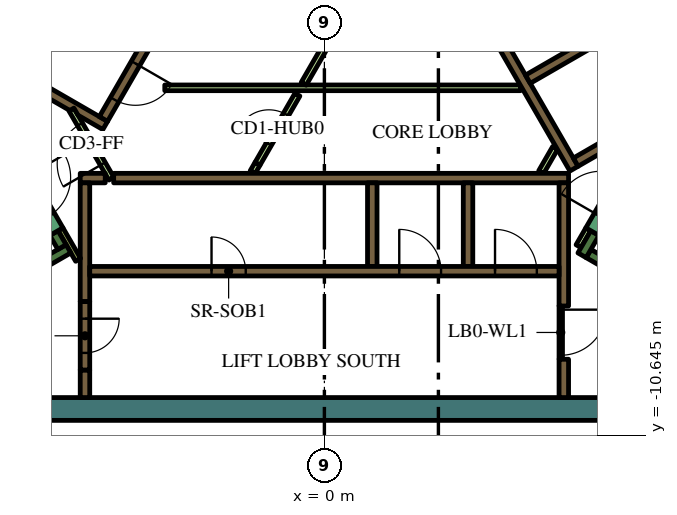
"""IFC4 building model, lengths in metres.
Left out: names, types, materials, properties, quantities, classifications, styles, units other than length and angle.
Written with IfcOpenShell. Run it as: python <this file> out.ifc"""

import sys

from ifc_helpers import new_model, si_unit, direction, frame, frame_2d, origin, place, context, subcontext, project, spatial, polyline, rectangle, outline, extrude, element, fill, save


model = new_model("IFC4")
c1 = context("Model", 3, precision=1e-05, world=origin(), true_north=direction((0.0, 1.0)))
c2 = subcontext(c1, "Body", "Model", "MODEL_VIEW")
j1 = project(units=[si_unit("LENGTHUNIT", "METRE"), si_unit("PLANEANGLEUNIT", "RADIAN")], contexts=[c1])
p1 = place(None, origin())
s1 = spatial("IfcSite", under=j1, at=p1, CompositionType="ELEMENT")
p2 = place(p1, origin())
s2 = spatial("IfcBuilding", under=s1, at=p2, CompositionType="ELEMENT")
p3 = place(p2, frame((0.0, 0.0, 321.6)))
s3 = spatial("IfcBuildingStorey", under=s2, at=p3, CompositionType="ELEMENT", Elevation=321.6)
p4 = place(p3, frame((8.904, -9.95, 0.0), z_axis=(0.0, 0.0, 1.0), x_axis=(-1.0, 0.0, 0.0)))
e1 = element("IfcWall", 1, at=p4, inside=s3, PredefinedType="SOLIDWALL", context=c2, shape_type="SweptSolid", body=[
    extrude(rectangle(XDim=22.161, YDim=0.6, at=frame_2d((11.081, 0.0))), origin(), (0.0, 0.0, 1.0), 6.0),
])
p5 = place(p3, frame((-4.652, 11.842, 0.0), z_axis=(0.0, 0.0, 1.0), x_axis=(-0.500003640647, -0.866023301845, 0.0)))
e2 = element("IfcWall", 2, at=p5, inside=s3, PredefinedType="SOLIDWALL", context=c2, shape_type="SweptSolid", body=[
    extrude(rectangle(XDim=15.858, YDim=0.6, at=frame_2d((7.929, 0.0))), origin(), (0.0, 0.0, 1.0), 6.0),
])
p6 = place(p3, frame((12.84, -9.261, 0.0), z_axis=(0.0, 0.0, 1.0), x_axis=(-0.866013990052, 0.500019768644, 0.0)))
e3 = element("IfcWall", 3, at=p6, inside=s3, PredefinedType="SOLIDWALL", context=c2, shape_type="SweptSolid", body=[
    extrude(rectangle(XDim=6.8, YDim=0.25, at=frame_2d((3.4, 0.0))), origin(), (0.0, 0.0, 1.0), 6.0),
])
p7 = place(p3, frame((6.78, -5.906, 0.0), z_axis=(0.0, 0.0, 1.0), x_axis=(0.500223362819, 0.865896406789, 0.0)))
e4 = element("IfcWall", 4, at=p7, inside=s3, PredefinedType="SOLIDWALL", context=c2, shape_type="SweptSolid", body=[
    extrude(rectangle(XDim=0.675, YDim=0.25, at=frame_2d((0.337, 0.0))), origin(), (0.0, 0.0, 1.0), 6.0),
])
p8 = place(p3, frame((-12.84, -9.261, 0.0), z_axis=(0.0, 0.0, 1.0), x_axis=(0.866016039709, 0.500016218704, 0.0)))
e5 = element("IfcWall", 5, at=p8, inside=s3, PredefinedType="SOLIDWALL", context=c2, shape_type="SweptSolid", body=[
    extrude(rectangle(XDim=7.05, YDim=0.25, at=frame_2d((3.525, 0.0))), origin(), (0.0, 0.0, 1.0), 6.0),
])
p9 = place(p3, frame((-6.905, -5.69, 0.0), z_axis=(0.0, 0.0, 1.0), x_axis=(-0.500402024738, 0.865793170242, 0.0)))
e6 = element("IfcWall", 6, at=p9, inside=s3, PredefinedType="SOLIDWALL", context=c2, shape_type="SweptSolid", body=[
    extrude(rectangle(XDim=0.425, YDim=0.25, at=frame_2d((0.212, 0.0))), origin(), (0.0, 0.0, 1.0), 6.0),
])
p10 = place(p3, frame((-5.545, -3.875, 0.0), z_axis=(0.0, 0.0, 1.0), x_axis=(1.0, 0.0, 0.0)))
e7 = element("IfcWall", 7, at=p10, inside=s3, PredefinedType="SOLIDWALL", context=c2, shape_type="SweptSolid", body=[
    extrude(rectangle(XDim=11.97, YDim=0.25, at=frame_2d((5.985, 0.0))), origin(), (0.0, 0.0, 1.0), 6.0),
])
p11 = place(p3, frame((-6.425, -3.875, 0.0), z_axis=(0.0, 0.0, 1.0), x_axis=(1.0, 0.0, 0.0)))
e8 = element("IfcWall", 8, at=p11, inside=s3, PredefinedType="SOLIDWALL", context=c2, shape_type="SweptSolid", body=[
    extrude(rectangle(XDim=0.658, YDim=0.25, at=frame_2d((0.329, 0.0))), origin(), (0.0, 0.0, 1.0), 6.0),
])
p12 = place(p3, frame((6.3, -7.24, 0.0), z_axis=(0.0, 0.0, 1.0), x_axis=(0.0, 1.0, 0.0)))
e9 = element("IfcWall", 9, at=p12, inside=s3, PredefinedType="SOLIDWALL", context=c2, shape_type="SweptSolid", body=[
    extrude(rectangle(XDim=3.24, YDim=0.25, at=frame_2d((1.62, 0.0))), origin(), (0.0, 0.0, 1.0), 6.0),
])
p13 = place(p3, frame((6.3, -9.65, 0.0), z_axis=(0.0, 0.0, 1.0), x_axis=(0.0, 1.0, 0.0)))
e10 = element("IfcWall", 10, at=p13, inside=s3, PredefinedType="SOLIDWALL", context=c2, shape_type="SweptSolid", body=[
    extrude(rectangle(XDim=1.008, YDim=0.25, at=frame_2d((0.504, 0.0))), origin(), (0.0, 0.0, 1.0), 6.0),
])
for number, where, z_axis, x_axis in (
    (11, (3.78, -4.0, 0.0), (0.0, 0.0, 1.0), (0.0, -1.0, 0.0)),
    (12, (1.26, -4.0, 0.0), (0.0, 0.0, 1.0), (0.0, -1.0, 0.0)),
):
    element("IfcWall", number, at=place(p3, frame(where, z_axis=z_axis, x_axis=x_axis)), inside=s3, PredefinedType="SOLIDWALL", context=c2, shape_type="SweptSolid", body=[
        extrude(rectangle(XDim=2.2, YDim=0.25, at=frame_2d((1.1, 0.0))), origin(), (0.0, 0.0, 1.0), 6.0),
    ])
p14 = place(p3, frame((-6.3, -7.125, 0.0), z_axis=(0.0, 0.0, 1.0), x_axis=(0.0, 1.0, 0.0)))
e13 = element("IfcWall", 13, at=p14, inside=s3, PredefinedType="SOLIDWALL", context=c2, shape_type="SweptSolid", body=[
    extrude(rectangle(XDim=3.125, YDim=0.25, at=frame_2d((1.562, 0.0))), origin(), (0.0, 0.0, 1.0), 6.0),
])
p15 = place(p3, frame((-6.3, -8.925, 0.0), z_axis=(0.0, 0.0, 1.0), x_axis=(0.0, -1.0, 0.0)))
e14 = element("IfcWall", 14, at=p15, inside=s3, PredefinedType="SOLIDWALL", context=c2, shape_type="SweptSolid", body=[
    extrude(rectangle(XDim=0.725, YDim=0.25, at=frame_2d((0.363, 0.0))), origin(), (0.0, 0.0, 1.0), 6.0),
])
p16 = place(p3, frame((6.568, -3.627, 0.0), z_axis=(0.0, 0.0, 1.0), x_axis=(-0.499999455981, 0.866025717874, 0.0)))
e15 = element("IfcWall", 15, at=p16, inside=s3, PredefinedType="SOLIDWALL", context=c2, shape_type="SweptSolid", body=[
    extrude(rectangle(XDim=11.978, YDim=0.25, at=frame_2d((5.989, 0.0))), origin(), (0.0, 0.0, 1.0), 6.0),
])
p17 = place(p3, frame((5.354, -1.274, 0.0), z_axis=(0.0, 0.0, 1.0), x_axis=(0.866008176907, 0.50002983664, 0.0)))
e16 = element("IfcWall", 16, at=p17, inside=s3, PredefinedType="SOLIDWALL", context=c2, shape_type="SweptSolid", body=[
    extrude(rectangle(XDim=2.2, YDim=0.25, at=frame_2d((1.1, 0.0))), origin(), (0.0, 0.0, 1.0), 6.0),
])
p18 = place(p3, frame((6.614, -3.456, 0.0), z_axis=(0.0, 0.0, 1.0), x_axis=(0.866025089694, 0.500000544019, 0.0)))
e17 = element("IfcWall", 17, at=p18, inside=s3, PredefinedType="SOLIDWALL", context=c2, shape_type="SweptSolid", body=[
    extrude(rectangle(XDim=2.305, YDim=0.25, at=frame_2d((1.153, 0.0))), origin(), (0.0, 0.0, 1.0), 6.0),
])
p19 = place(p3, frame((-8.06, -1.311, 0.0), z_axis=(0.0, 0.0, 1.0), x_axis=(0.50000273126, 0.866023826885, 0.0)))
e18 = element("IfcWall", 18, at=p19, inside=s3, PredefinedType="SOLIDWALL", context=c2, shape_type="SweptSolid", body=[
    extrude(rectangle(XDim=10.33, YDim=0.25, at=frame_2d((5.165, 0.0))), origin(), (0.0, 0.0, 1.0), 6.0),
])
p20 = place(p3, origin())
e19 = element("IfcWall", 19, at=p20, inside=s3, PredefinedType="SOLIDWALL", context=c2, shape_type="SweptSolid", body=[
    extrude(outline(polyline([(-5.922, -2.257), (-5.922, -2.257), (-5.705, -2.382), (-5.83, -2.598), (-6.483, -2.221), (-6.591, -2.033), (-6.591, -2.033), (-6.7, -2.096), (-7.952, -1.373), (-7.827, -1.156), (-5.922, -2.257)])), origin(), (0.0, 0.0, 1.0), 6.0),
])
p21 = place(p3, frame((-6.48, -6.027, 0.0), z_axis=(0.0, 0.0, 1.0), x_axis=(-0.499927229454, 0.866067413802, 0.0)))
e20 = element("IfcWall", 20, at=p21, inside=s3, PredefinedType="PARTITIONING", context=c2, shape_type="SweptSolid", body=[
    extrude(rectangle(XDim=0.929, YDim=0.15, at=frame_2d((0.464, 0.0))), origin(), (0.0, 0.0, 1.0), 6.0),
])
p22 = place(p3, frame((6.945, -5.222, 0.0), z_axis=(0.0, 0.0, 1.0), x_axis=(-0.499818422106, -0.866130212453, 0.0)))
e21 = element("IfcWall", 21, at=p22, inside=s3, PredefinedType="PARTITIONING", context=c2, shape_type="SweptSolid", body=[
    extrude(rectangle(XDim=0.514, YDim=0.15, at=frame_2d((0.257, 0.0))), origin(), (0.0, 0.0, 1.0), 5.3),
])
p23 = place(p3, frame((5.705, -3.718, 0.0), z_axis=(0.0, 0.0, 1.0), x_axis=(0.499962090823, 0.866047289552, 0.0)))
e22 = element("IfcWall", 22, at=p23, inside=s3, PredefinedType="PARTITIONING", context=c2, shape_type="SweptSolid", body=[
    extrude(rectangle(XDim=0.735, YDim=0.15, at=frame_2d((0.367, 0.0))), origin(), (0.0, 0.0, 1.0), 5.3),
])
p24 = place(p3, frame((-4.2, -1.5, 0.0), z_axis=(0.0, 0.0, 1.0), x_axis=(1.0, 0.0, 0.0)))
e23 = element("IfcWall", 23, at=p24, inside=s3, PredefinedType="PARTITIONING", context=c2, shape_type="SweptSolid", body=[
    extrude(rectangle(XDim=9.359, YDim=0.15, at=frame_2d((4.68, 0.0))), origin(), (0.0, 0.0, 1.0), 5.3),
])
p25 = place(p3, frame((-0.544, -1.393, 0.0), z_axis=(0.0, 0.0, 1.0), x_axis=(0.499928740635, 0.866066541489, 0.0)))
e24 = element("IfcWall", 24, at=p25, inside=s3, PredefinedType="PARTITIONING", context=c2, shape_type="SweptSolid", body=[
    extrude(rectangle(XDim=1.912, YDim=0.15, at=frame_2d((0.956, 0.0))), origin(), (0.0, 0.0, 1.0), 5.3),
])
p26 = place(p3, frame((-1.887, -3.718, 0.0), z_axis=(0.0, 0.0, 1.0), x_axis=(0.500165633897, 0.865929753888, 0.0)))
e25 = element("IfcWall", 25, at=p26, inside=s3, PredefinedType="PARTITIONING", context=c2, shape_type="SweptSolid", body=[
    extrude(rectangle(XDim=0.254, YDim=0.15, at=frame_2d((0.127, 0.0))), origin(), (0.0, 0.0, 1.0), 5.3),
])
p27 = place(p3, frame((-6.175, -6.325, 0.0), z_axis=(0.0, 0.0, 1.0), x_axis=(1.0, 0.0, 0.0)))
e26 = element("IfcWall", 26, at=p27, inside=s3, PredefinedType="SOLIDWALL", context=c2, shape_type="SweptSolid", body=[
    extrude(rectangle(XDim=12.35, YDim=0.25, at=frame_2d((6.175, 0.0))), origin(), (0.0, 0.0, 1.0), 6.0),
])
p28 = place(p27, frame((3.205, 0.0, 0.0)))
e27 = element("IfcOpeningElement", 27, at=p28, cuts=e26, PredefinedType="OPENING", context=c2, shape_type="SweptSolid", body=[
    extrude(rectangle(XDim=0.9, YDim=2.1, at=frame_2d((0.45, 1.05))), frame((0.0, 0.135, 0.0), z_axis=(0.0, -1.0, 0.0), x_axis=(1.0, 0.0, 0.0)), (0.0, 0.0, 1.0), 0.27),
])
p29 = place(p27, frame((8.145, 0.0, 0.0)))
e28 = element("IfcOpeningElement", 28, at=p29, cuts=e26, PredefinedType="OPENING", context=c2, shape_type="SweptSolid", body=[
    extrude(rectangle(XDim=1.1, YDim=2.1, at=frame_2d((0.55, 1.05))), frame((0.0, 0.135, 0.0), z_axis=(0.0, -1.0, 0.0), x_axis=(1.0, 0.0, 0.0)), (0.0, 0.0, 1.0), 0.27),
])
p30 = place(p27, frame((10.665, 0.0, 0.0)))
e29 = element("IfcOpeningElement", 29, at=p30, cuts=e26, PredefinedType="OPENING", context=c2, shape_type="SweptSolid", body=[
    extrude(rectangle(XDim=1.1, YDim=2.1, at=frame_2d((0.55, 1.05))), frame((0.0, 0.135, 0.0), z_axis=(0.0, -1.0, 0.0), x_axis=(1.0, 0.0, 0.0)), (0.0, 0.0, 1.0), 0.27),
])
p31 = place(p3, frame((8.565, -2.185, 0.0), z_axis=(0.0, 0.0, 1.0), x_axis=(-0.499997954832, 0.866026584559, 0.0)))
e30 = element("IfcWall", 30, at=p31, inside=s3, PredefinedType="SOLIDWALL", context=c2, shape_type="SweptSolid", body=[
    extrude(rectangle(XDim=12.35, YDim=0.25, at=frame_2d((6.175, 0.0))), origin(), (0.0, 0.0, 1.0), 6.0),
])
p32 = place(p31, frame((0.685, 0.0, 0.0)))
e31 = element("IfcOpeningElement", 31, at=p32, cuts=e30, PredefinedType="OPENING", context=c2, shape_type="SweptSolid", body=[
    extrude(rectangle(XDim=0.9, YDim=2.1, at=frame_2d((0.45, 1.05))), frame((0.0, 0.135, 0.0), z_axis=(0.0, -1.0, 0.0), x_axis=(1.0, 0.0, 0.0)), (0.0, 0.0, 1.0), 0.27),
])
p33 = place(p31, frame((3.105, 0.0, 0.0)))
e32 = element("IfcOpeningElement", 32, at=p33, cuts=e30, PredefinedType="OPENING", context=c2, shape_type="SweptSolid", body=[
    extrude(rectangle(XDim=1.1, YDim=2.1, at=frame_2d((0.55, 1.05))), frame((0.0, 0.135, 0.0), z_axis=(0.0, -1.0, 0.0), x_axis=(1.0, 0.0, 0.0)), (0.0, 0.0, 1.0), 0.27),
])
p34 = place(p31, frame((5.625, 0.0, 0.0)))
e33 = element("IfcOpeningElement", 33, at=p34, cuts=e30, PredefinedType="OPENING", context=c2, shape_type="SweptSolid", body=[
    extrude(rectangle(XDim=1.1, YDim=2.1, at=frame_2d((0.55, 1.05))), frame((0.0, 0.135, 0.0), z_axis=(0.0, -1.0, 0.0), x_axis=(1.0, 0.0, 0.0)), (0.0, 0.0, 1.0), 0.27),
])
p35 = place(p31, frame((8.145, 0.0, 0.0)))
e34 = element("IfcOpeningElement", 34, at=p35, cuts=e30, PredefinedType="OPENING", context=c2, shape_type="SweptSolid", body=[
    extrude(rectangle(XDim=1.1, YDim=2.1, at=frame_2d((0.55, 1.05))), frame((0.0, 0.135, 0.0), z_axis=(0.0, -1.0, 0.0), x_axis=(1.0, 0.0, 0.0)), (0.0, 0.0, 1.0), 0.27),
])
p36 = place(p31, frame((10.665, 0.0, 0.0)))
e35 = element("IfcOpeningElement", 35, at=p36, cuts=e30, PredefinedType="OPENING", context=c2, shape_type="SweptSolid", body=[
    extrude(rectangle(XDim=1.1, YDim=2.1, at=frame_2d((0.55, 1.05))), frame((0.0, 0.135, 0.0), z_axis=(0.0, -1.0, 0.0), x_axis=(1.0, 0.0, 0.0)), (0.0, 0.0, 1.0), 0.27),
])
p37 = place(p3, frame((-0.898, 6.194, 0.0), z_axis=(0.0, 0.0, 1.0), x_axis=(-0.499996202215, -0.866027596426, 0.0)))
e36 = element("IfcWall", 36, at=p37, inside=s3, PredefinedType="SOLIDWALL", context=c2, shape_type="SweptSolid", body=[
    extrude(rectangle(XDim=9.83, YDim=0.25, at=frame_2d((4.915, 0.0))), origin(), (0.0, 0.0, 1.0), 6.0),
])
p38 = place(p37, frame((0.585, 0.0, 0.0)))
e37 = element("IfcOpeningElement", 37, at=p38, cuts=e36, PredefinedType="OPENING", context=c2, shape_type="SweptSolid", body=[
    extrude(rectangle(XDim=1.1, YDim=2.1, at=frame_2d((0.55, 1.05))), frame((0.0, 0.135, 0.0), z_axis=(0.0, -1.0, 0.0), x_axis=(1.0, 0.0, 0.0)), (0.0, 0.0, 1.0), 0.27),
])
p39 = place(p37, frame((3.105, 0.0, 0.0)))
e38 = element("IfcOpeningElement", 38, at=p39, cuts=e36, PredefinedType="OPENING", context=c2, shape_type="SweptSolid", body=[
    extrude(rectangle(XDim=1.1, YDim=2.1, at=frame_2d((0.55, 1.05))), frame((0.0, 0.135, 0.0), z_axis=(0.0, -1.0, 0.0), x_axis=(1.0, 0.0, 0.0)), (0.0, 0.0, 1.0), 0.27),
])
p40 = place(p37, frame((5.625, 0.0, 0.0)))
e39 = element("IfcOpeningElement", 39, at=p40, cuts=e36, PredefinedType="OPENING", context=c2, shape_type="SweptSolid", body=[
    extrude(rectangle(XDim=1.1, YDim=2.1, at=frame_2d((0.55, 1.05))), frame((0.0, 0.135, 0.0), z_axis=(0.0, -1.0, 0.0), x_axis=(1.0, 0.0, 0.0)), (0.0, 0.0, 1.0), 0.27),
])
p41 = place(p37, frame((8.145, 0.0, 0.0)))
e40 = element("IfcOpeningElement", 40, at=p41, cuts=e36, PredefinedType="OPENING", context=c2, shape_type="SweptSolid", body=[
    extrude(rectangle(XDim=1.1, YDim=2.1, at=frame_2d((0.55, 1.05))), frame((0.0, 0.135, 0.0), z_axis=(0.0, -1.0, 0.0), x_axis=(1.0, 0.0, 0.0)), (0.0, 0.0, 1.0), 0.27),
])
p42 = place(p3, frame((7.053, -5.284, 0.0), z_axis=(0.0, 0.0, 1.0), x_axis=(0.500078061341, 0.865980330357, 0.0)))
e41 = element("IfcWall", 41, at=p42, inside=s3, PredefinedType="SOLIDWALL", context=c2, shape_type="SweptSolid", body=[
    extrude(rectangle(XDim=2.1, YDim=0.4, at=frame_2d((1.05, 0.0))), origin(), (0.0, 0.0, 1.0), 6.0),
])
p43 = place(p42, frame((0.45, 0.0, 0.0)))
e42 = element("IfcOpeningElement", 42, at=p43, cuts=e41, PredefinedType="OPENING", context=c2, shape_type="SweptSolid", body=[
    extrude(rectangle(XDim=1.2, YDim=2.1, at=frame_2d((0.6, 1.05))), frame((0.0, 0.21, 0.0), z_axis=(0.0, -1.0, 0.0), x_axis=(1.0, 0.0, 0.0)), (0.0, 0.0, 1.0), 0.42),
])
p44 = place(p3, frame((-8.103, -3.466, 0.0), z_axis=(0.0, 0.0, 1.0), x_axis=(0.500078061341, -0.865980330357, 0.0)))
e43 = element("IfcWall", 43, at=p44, inside=s3, PredefinedType="SOLIDWALL", context=c2, shape_type="SweptSolid", body=[
    extrude(rectangle(XDim=2.1, YDim=0.4, at=frame_2d((1.05, 0.0))), origin(), (0.0, 0.0, 1.0), 6.0),
])
p45 = place(p44, frame((0.45, 0.0, 0.0)))
e44 = element("IfcOpeningElement", 44, at=p45, cuts=e43, PredefinedType="OPENING", context=c2, shape_type="SweptSolid", body=[
    extrude(rectangle(XDim=1.2, YDim=2.1, at=frame_2d((0.6, 1.05))), frame((0.0, 0.21, 0.0), z_axis=(0.0, -1.0, 0.0), x_axis=(1.0, 0.0, 0.0)), (0.0, 0.0, 1.0), 0.42),
])
p46 = place(p3, frame((-6.3, -7.125, 0.0), z_axis=(0.0, 0.0, 1.0), x_axis=(0.0, -1.0, 0.0)))
e45 = element("IfcWall", 45, at=p46, inside=s3, PredefinedType="SOLIDWALL", context=c2, shape_type="SweptSolid", body=[
    extrude(rectangle(XDim=1.8, YDim=0.25, at=frame_2d((0.9, 0.0))), origin(), (0.0, 0.0, 1.0), 6.0),
])
p47 = place(p46, frame((0.45, 0.0, 0.0)))
e46 = element("IfcOpeningElement", 46, at=p47, cuts=e45, PredefinedType="OPENING", context=c2, shape_type="SweptSolid", body=[
    extrude(rectangle(XDim=0.9, YDim=2.1, at=frame_2d((0.45, 1.05))), frame((0.0, 0.135, 0.0), z_axis=(0.0, -1.0, 0.0), x_axis=(1.0, 0.0, 0.0)), (0.0, 0.0, 1.0), 0.27),
])
p48 = place(p3, frame((-1.76, -3.498, 0.0), z_axis=(0.0, 0.0, 1.0), x_axis=(0.499977374825, 0.866038466041, 0.0)))
e47 = element("IfcWall", 47, at=p48, inside=s3, PredefinedType="PARTITIONING", context=c2, shape_type="SweptSolid", body=[
    extrude(rectangle(XDim=2.1, YDim=0.15, at=frame_2d((1.05, 0.0))), origin(), (0.0, 0.0, 1.0), 5.3),
])
p49 = place(p48, frame((0.6, 0.0, 0.0)))
e48 = element("IfcOpeningElement", 48, at=p49, cuts=e47, PredefinedType="OPENING", context=c2, shape_type="SweptSolid", body=[
    extrude(rectangle(XDim=0.9, YDim=2.1, at=frame_2d((0.45, 1.05))), frame((0.0, 0.085, 0.0), z_axis=(0.0, -1.0, 0.0), x_axis=(1.0, 0.0, 0.0)), (0.0, 0.0, 1.0), 0.17),
])
p50 = place(p3, frame((-5.606, -3.89, 0.0), z_axis=(0.0, 0.0, 1.0), x_axis=(-0.500027713859, 0.866009402589, 0.0)))
e49 = element("IfcWall", 49, at=p50, inside=s3, PredefinedType="PARTITIONING", context=c2, shape_type="SweptSolid", body=[
    extrude(rectangle(XDim=2.1, YDim=0.15, at=frame_2d((1.05, 0.0))), origin(), (0.0, 0.0, 1.0), 5.3),
])
p51 = place(p50, frame((0.45, 0.0, 0.0)))
e50 = element("IfcOpeningElement", 50, at=p51, cuts=e49, PredefinedType="OPENING", context=c2, shape_type="SweptSolid", body=[
    extrude(rectangle(XDim=1.2, YDim=2.1, at=frame_2d((0.6, 1.05))), frame((0.0, 0.085, 0.0), z_axis=(0.0, -1.0, 0.0), x_axis=(1.0, 0.0, 0.0)), (0.0, 0.0, 1.0), 0.17),
])
p52 = place(p3, frame((6.22, -7.237, 0.0), z_axis=(0.0, 0.0, 1.0), x_axis=(0.0, -1.0, 0.0)))
e51 = element("IfcWall", 51, at=p52, inside=s3, PredefinedType="PARTITIONING", context=c2, shape_type="SweptSolid", body=[
    extrude(rectangle(XDim=1.4, YDim=0.09, at=frame_2d((0.7, 0.0))), origin(), (0.0, 0.0, 1.0), 5.3),
])
p53 = place(p52, frame((0.1, 0.0, 0.0)))
e52 = element("IfcOpeningElement", 52, at=p53, cuts=e51, PredefinedType="OPENING", context=c2, shape_type="SweptSolid", body=[
    extrude(rectangle(XDim=1.2, YDim=2.1, at=frame_2d((0.6, 1.05))), frame((0.0, 0.055, 0.0), z_axis=(0.0, -1.0, 0.0), x_axis=(1.0, 0.0, 0.0)), (0.0, 0.0, 1.0), 0.11),
])
p54 = place(p3, frame((-3.984, 19.6, 0.0), z_axis=(0.0, 0.0, 1.0), x_axis=(-0.500001742692, -0.866024397638, 0.0)))
e53 = element("IfcWall", 53, at=p54, inside=s3, PredefinedType="PARTITIONING", context=c2, shape_type="SweptSolid", body=[
    extrude(rectangle(XDim=29.965, YDim=0.15, at=frame_2d((14.982, 0.0))), origin(), (0.0, 0.0, 1.0), 5.3),
])
p55 = place(p54, frame((14.082, 0.0, 0.0)))
e54 = element("IfcOpeningElement", 54, at=p55, cuts=e53, PredefinedType="OPENING", context=c2, shape_type="SweptSolid", body=[
    extrude(rectangle(XDim=1.8, YDim=2.1, at=frame_2d((0.9, 1.05))), frame((0.0, 0.085, 0.0), z_axis=(0.0, -1.0, 0.0), x_axis=(1.0, 0.0, 0.0)), (0.0, 0.0, 1.0), 0.17),
])
p56 = place(p54, frame((9.894, 0.0, 0.0)))
e55 = element("IfcOpeningElement", 55, at=p56, cuts=e53, PredefinedType="OPENING", context=c2, shape_type="SweptSolid", body=[
    extrude(rectangle(XDim=1.8, YDim=2.1, at=frame_2d((0.9, 1.05))), frame((0.0, 0.085, 0.0), z_axis=(0.0, -1.0, 0.0), x_axis=(1.0, 0.0, 0.0)), (0.0, 0.0, 1.0), 0.17),
])
p57 = place(p28, origin())
e56 = element("IfcDoor", 56, at=p57, inside=s3, OperationType="SINGLE_SWING_LEFT", PredefinedType="DOOR", context=c2, shape_type="SweptSolid", body=[
    extrude(rectangle(XDim=0.9, YDim=2.1, at=frame_2d((0.45, 1.05))), frame((0.0, 0.025, 0.0), z_axis=(0.0, -1.0, 0.0), x_axis=(1.0, 0.0, 0.0)), (0.0, 0.0, 1.0), 0.05),
])
fill(e27, e56)
p58 = place(p29, origin())
e57 = element("IfcDoor", 57, at=p58, inside=s3, OperationType="DOUBLE_DOOR_SLIDING", PredefinedType="DOOR", context=c2, shape_type="SweptSolid", body=[
    extrude(rectangle(XDim=1.1, YDim=2.1, at=frame_2d((0.55, 1.05))), frame((0.0, 0.025, 0.0), z_axis=(0.0, -1.0, 0.0), x_axis=(1.0, 0.0, 0.0)), (0.0, 0.0, 1.0), 0.05),
])
fill(e28, e57)
p59 = place(p30, origin())
e58 = element("IfcDoor", 58, at=p59, inside=s3, OperationType="DOUBLE_DOOR_SLIDING", PredefinedType="DOOR", context=c2, shape_type="SweptSolid", body=[
    extrude(rectangle(XDim=1.1, YDim=2.1, at=frame_2d((0.55, 1.05))), frame((0.0, 0.025, 0.0), z_axis=(0.0, -1.0, 0.0), x_axis=(1.0, 0.0, 0.0)), (0.0, 0.0, 1.0), 0.05),
])
fill(e29, e58)
p60 = place(p41, origin())
e59 = element("IfcDoor", 59, at=p60, inside=s3, OperationType="DOUBLE_DOOR_SLIDING", PredefinedType="DOOR", context=c2, shape_type="SweptSolid", body=[
    extrude(rectangle(XDim=1.1, YDim=2.1, at=frame_2d((0.55, 1.05))), frame((0.0, 0.025, 0.0), z_axis=(0.0, -1.0, 0.0), x_axis=(1.0, 0.0, 0.0)), (0.0, 0.0, 1.0), 0.05),
])
fill(e40, e59)
p61 = place(p47, origin())
e60 = element("IfcDoor", 60, at=p61, inside=s3, OperationType="SINGLE_SWING_LEFT", PredefinedType="DOOR", context=c2, shape_type="SweptSolid", body=[
    extrude(rectangle(XDim=0.9, YDim=2.1, at=frame_2d((0.45, 1.05))), frame((0.0, 0.025, 0.0), z_axis=(0.0, -1.0, 0.0), x_axis=(1.0, 0.0, 0.0)), (0.0, 0.0, 1.0), 0.05),
])
fill(e46, e60)
p62 = place(p49, origin())
e61 = element("IfcDoor", 61, at=p62, inside=s3, OperationType="SINGLE_SWING_LEFT", PredefinedType="DOOR", context=c2, shape_type="SweptSolid", body=[
    extrude(rectangle(XDim=0.9, YDim=2.1, at=frame_2d((0.45, 1.05))), frame((0.0, 0.025, 0.0), z_axis=(0.0, -1.0, 0.0), x_axis=(1.0, 0.0, 0.0)), (0.0, 0.0, 1.0), 0.05),
])
fill(e48, e61)
p63 = place(p51, origin())
e62 = element("IfcDoor", 62, at=p63, inside=s3, OperationType="SINGLE_SWING_LEFT", PredefinedType="DOOR", context=c2, shape_type="SweptSolid", body=[
    extrude(rectangle(XDim=1.2, YDim=2.1, at=frame_2d((0.6, 1.05))), frame((0.0, 0.025, 0.0), z_axis=(0.0, -1.0, 0.0), x_axis=(1.0, 0.0, 0.0)), (0.0, 0.0, 1.0), 0.05),
])
fill(e50, e62)
p64 = place(p53, origin())
e63 = element("IfcDoor", 63, at=p64, inside=s3, OperationType="SINGLE_SWING_LEFT", PredefinedType="DOOR", context=c2, shape_type="SweptSolid", body=[
    extrude(rectangle(XDim=1.2, YDim=2.1, at=frame_2d((0.6, 1.05))), frame((0.0, 0.025, 0.0), z_axis=(0.0, -1.0, 0.0), x_axis=(1.0, 0.0, 0.0)), (0.0, 0.0, 1.0), 0.05),
])
fill(e52, e63)
save(model, sys.argv[1])
